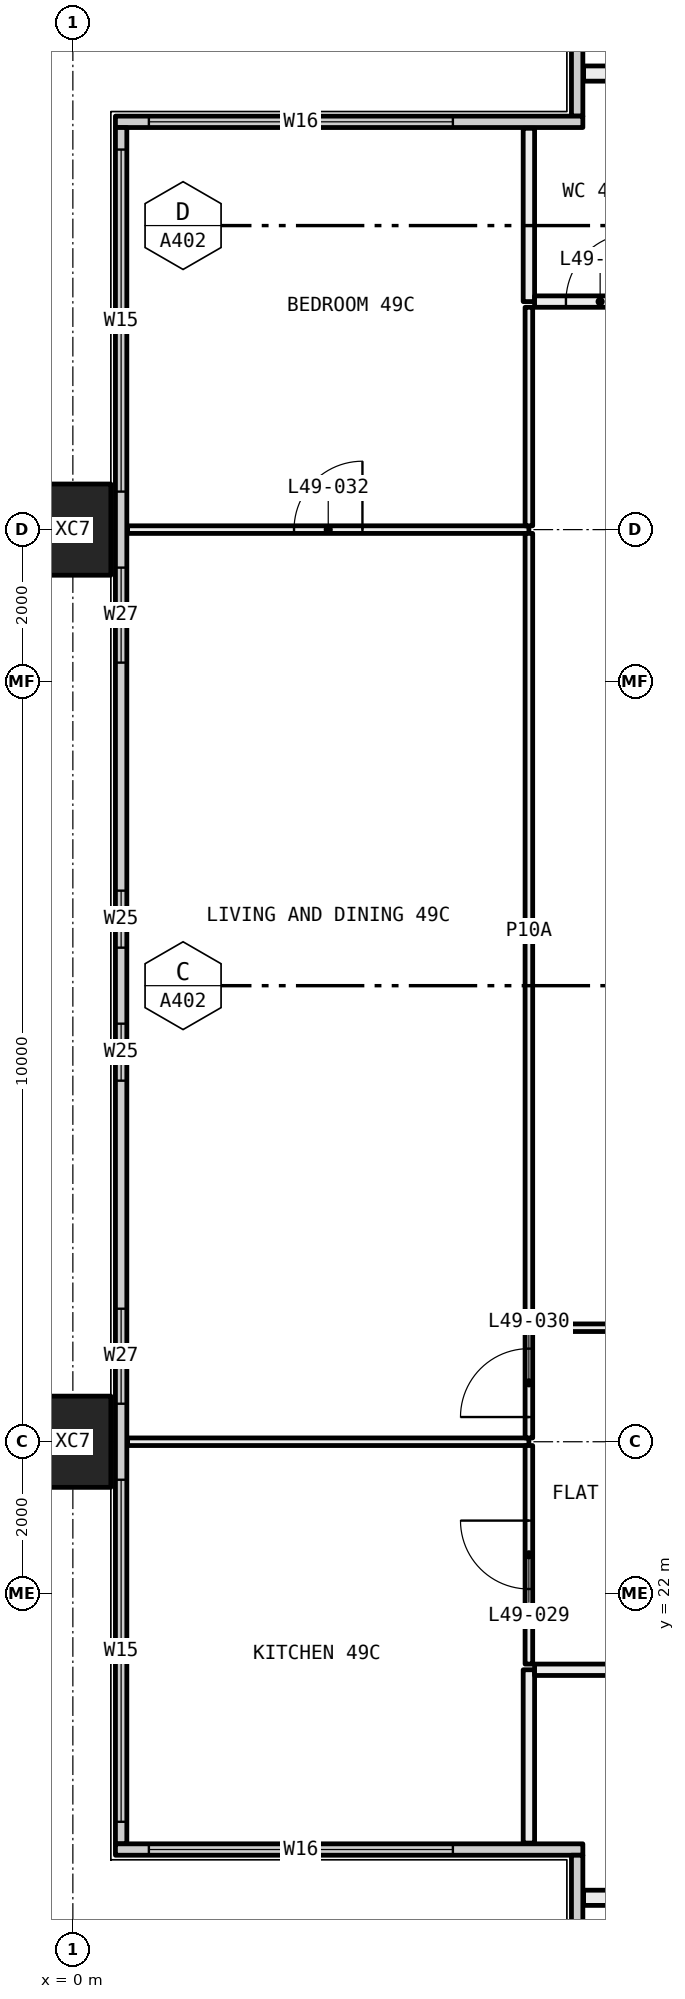
"""IFC4 building model, lengths in metres.
Left out: names, types, materials, properties, quantities, classifications, styles, units other than length and angle.
Written with IfcOpenShell. Run it as: python <this file> out.ifc"""

import sys

from ifc_helpers import new_model, si_unit, direction, frame, frame_2d, origin, origin_2d, place, context, subcontext, project, spatial, rectangle, hollow_rectangle, extrude, element, fill, save


model = new_model("IFC4")
c1 = context("Model", 3, precision=1e-05, world=origin(), true_north=direction((0.0, 1.0)))
c2 = subcontext(c1, "Body", "Model", "MODEL_VIEW")
j1 = project(units=[si_unit("LENGTHUNIT", "METRE"), si_unit("PLANEANGLEUNIT", "RADIAN")], contexts=[c1])
p1 = place(None, origin())
s1 = spatial("IfcSite", under=j1, at=p1, CompositionType="ELEMENT")
p2 = place(p1, origin())
s2 = spatial("IfcBuilding", under=s1, at=p2, CompositionType="ELEMENT")
p3 = place(p2, frame((0.0, 0.0, 185.85)))
s3 = spatial("IfcBuildingStorey", under=s2, at=p3, CompositionType="ELEMENT", Elevation=185.85)
for number, where, z_axis, x_axis in (
    (1, (0.0, 24.0, -0.4), (0.0, 0.0, 1.0), (0.0, 1.0, 0.0)),
    (2, (0.0, 36.0, -0.4), (0.0, 0.0, 1.0), (0.0, 1.0, 0.0)),
):
    element("IfcColumn", number, at=place(p3, frame(where, z_axis=z_axis, x_axis=x_axis)), inside=s3, PredefinedType="COLUMN", context=c2, shape_type="SweptSolid", body=[
        extrude(hollow_rectangle(XDim=1.2, YDim=1.0, WallThickness=0.045, at=origin_2d()), origin(), (0.0, 0.0, 1.0), 3.45),
    ])
p4 = place(p3, frame((6.635, 41.44, 0.0), z_axis=(0.0, 0.0, 1.0), x_axis=(0.0, 1.0, 0.0)))
e3 = element("IfcWall", 3, at=p4, inside=s3, PredefinedType="ELEMENTEDWALL", context=c2, shape_type="SweptSolid", body=[
    extrude(rectangle(XDim=5.85, YDim=0.15, at=frame_2d((2.925, 0.0))), origin(), (0.0, 0.0, 1.0), 3.05),
])
p5 = place(p4, frame((1.56, 0.0, 0.45)))
e4 = element("IfcOpeningElement", 4, at=p5, cuts=e3, PredefinedType="OPENING", context=c2, shape_type="SweptSolid", body=[
    extrude(rectangle(XDim=4.0, YDim=2.55, at=frame_2d((2.0, 1.275))), frame((0.0, 0.085, 0.0), z_axis=(0.0, -1.0, 0.0), x_axis=(1.0, 0.0, 0.0)), (0.0, 0.0, 1.0), 0.17),
])
p6 = place(p3, frame((0.56, 41.365, 0.0), z_axis=(0.0, 0.0, 1.0), x_axis=(1.0, 0.0, 0.0)))
e5 = element("IfcWall", 5, at=p6, inside=s3, PredefinedType="ELEMENTEDWALL", context=c2, shape_type="SweptSolid", body=[
    extrude(rectangle(XDim=6.15, YDim=0.15, at=frame_2d((3.075, 0.0))), origin(), (0.0, 0.0, 1.0), 3.05),
])
p7 = place(p6, frame((0.44, 0.0, 0.45)))
e6 = element("IfcOpeningElement", 6, at=p7, cuts=e5, PredefinedType="OPENING", context=c2, shape_type="SweptSolid", body=[
    extrude(rectangle(XDim=4.0, YDim=2.55, at=frame_2d((2.0, 1.275))), frame((0.0, 0.085, 0.0), z_axis=(0.0, -1.0, 0.0), x_axis=(1.0, 0.0, 0.0)), (0.0, 0.0, 1.0), 0.17),
])
p8 = place(p3, frame((0.635, 18.71, 0.0), z_axis=(0.0, 0.0, 1.0), x_axis=(0.0, 1.0, 0.0)))
e7 = element("IfcWall", 7, at=p8, inside=s3, PredefinedType="ELEMENTEDWALL", context=c2, shape_type="SweptSolid", body=[
    extrude(rectangle(XDim=22.58, YDim=0.15, at=frame_2d((11.29, 0.0))), origin(), (0.0, 0.0, 1.0), 3.05),
])
p9 = place(p8, frame((0.29, 0.0, 0.45)))
e8 = element("IfcOpeningElement", 8, at=p9, cuts=e7, PredefinedType="OPENING", context=c2, shape_type="SweptSolid", body=[
    extrude(rectangle(XDim=4.5, YDim=2.55, at=frame_2d((2.25, 1.275))), frame((0.0, 0.085, 0.0), z_axis=(0.0, -1.0, 0.0), x_axis=(1.0, 0.0, 0.0)), (0.0, 0.0, 1.0), 0.17),
])
p10 = place(p8, frame((5.79, 0.0, 0.45)))
e9 = element("IfcOpeningElement", 9, at=p10, cuts=e7, PredefinedType="OPENING", context=c2, shape_type="SweptSolid", body=[
    extrude(rectangle(XDim=1.25, YDim=2.55, at=frame_2d((0.625, 1.275))), frame((0.0, 0.085, 0.0), z_axis=(0.0, -1.0, 0.0), x_axis=(1.0, 0.0, 0.0)), (0.0, 0.0, 1.0), 0.17),
])
p11 = place(p8, frame((10.04, 0.0, 0.45)))
e10 = element("IfcOpeningElement", 10, at=p11, cuts=e7, PredefinedType="OPENING", context=c2, shape_type="SweptSolid", body=[
    extrude(rectangle(XDim=0.75, YDim=2.55, at=frame_2d((0.375, 1.275))), frame((0.0, 0.085, 0.0), z_axis=(0.0, -1.0, 0.0), x_axis=(1.0, 0.0, 0.0)), (0.0, 0.0, 1.0), 0.17),
])
p12 = place(p8, frame((11.79, 0.0, 0.45)))
e11 = element("IfcOpeningElement", 11, at=p12, cuts=e7, PredefinedType="OPENING", context=c2, shape_type="SweptSolid", body=[
    extrude(rectangle(XDim=0.75, YDim=2.55, at=frame_2d((0.375, 1.275))), frame((0.0, 0.085, 0.0), z_axis=(0.0, -1.0, 0.0), x_axis=(1.0, 0.0, 0.0)), (0.0, 0.0, 1.0), 0.17),
])
p13 = place(p8, frame((15.54, 0.0, 0.45)))
e12 = element("IfcOpeningElement", 12, at=p13, cuts=e7, PredefinedType="OPENING", context=c2, shape_type="SweptSolid", body=[
    extrude(rectangle(XDim=1.25, YDim=2.55, at=frame_2d((0.625, 1.275))), frame((0.0, 0.085, 0.0), z_axis=(0.0, -1.0, 0.0), x_axis=(1.0, 0.0, 0.0)), (0.0, 0.0, 1.0), 0.17),
])
p14 = place(p8, frame((17.79, 0.0, 0.45)))
e13 = element("IfcOpeningElement", 13, at=p14, cuts=e7, PredefinedType="OPENING", context=c2, shape_type="SweptSolid", body=[
    extrude(rectangle(XDim=4.5, YDim=2.55, at=frame_2d((2.25, 1.275))), frame((0.0, 0.085, 0.0), z_axis=(0.0, -1.0, 0.0), x_axis=(1.0, 0.0, 0.0)), (0.0, 0.0, 1.0), 0.17),
])
p15 = place(p3, frame((0.56, 18.635, 0.0), z_axis=(0.0, 0.0, 1.0), x_axis=(1.0, 0.0, 0.0)))
e14 = element("IfcWall", 14, at=p15, inside=s3, PredefinedType="ELEMENTEDWALL", context=c2, shape_type="SweptSolid", body=[
    extrude(rectangle(XDim=6.15, YDim=0.15, at=frame_2d((3.075, 0.0))), origin(), (0.0, 0.0, 1.0), 3.05),
])
p16 = place(p15, frame((0.44, 0.0, 0.45)))
e15 = element("IfcOpeningElement", 15, at=p16, cuts=e14, PredefinedType="OPENING", context=c2, shape_type="SweptSolid", body=[
    extrude(rectangle(XDim=4.0, YDim=2.55, at=frame_2d((2.0, 1.275))), frame((0.0, 0.085, 0.0), z_axis=(0.0, -1.0, 0.0), x_axis=(1.0, 0.0, 0.0)), (0.0, 0.0, 1.0), 0.17),
])
p17 = place(p3, frame((6.635, 12.71, 0.0), z_axis=(0.0, 0.0, 1.0), x_axis=(0.0, 1.0, 0.0)))
e16 = element("IfcWall", 16, at=p17, inside=s3, PredefinedType="ELEMENTEDWALL", context=c2, shape_type="SweptSolid", body=[
    extrude(rectangle(XDim=5.85, YDim=0.15, at=frame_2d((2.925, 0.0))), origin(), (0.0, 0.0, 1.0), 3.05),
])
p18 = place(p17, frame((0.29, 0.0, 0.45)))
e17 = element("IfcOpeningElement", 17, at=p18, cuts=e16, PredefinedType="OPENING", context=c2, shape_type="SweptSolid", body=[
    extrude(rectangle(XDim=4.0, YDim=2.55, at=frame_2d((2.0, 1.275))), frame((0.0, 0.085, 0.0), z_axis=(0.0, -1.0, 0.0), x_axis=(1.0, 0.0, 0.0)), (0.0, 0.0, 1.0), 0.17),
])
p19 = place(p3, frame((10.1, 18.0, 0.0), z_axis=(0.0, 0.0, 1.0), x_axis=(-1.0, 0.0, 0.0)))
e18 = element("IfcWall", 18, at=p19, inside=s3, PredefinedType="PARTITIONING", context=c2, shape_type="SweptSolid", body=[
    extrude(rectangle(XDim=3.38, YDim=0.2, at=frame_2d((1.69, 0.0))), origin(), (0.0, 0.0, 1.0), 3.05),
])
p20 = place(p3, frame((6.72, 42.0, 0.0), z_axis=(0.0, 0.0, 1.0), x_axis=(1.0, 0.0, 0.0)))
e19 = element("IfcWall", 19, at=p20, inside=s3, PredefinedType="PARTITIONING", context=c2, shape_type="SweptSolid", body=[
    extrude(rectangle(XDim=1.08, YDim=0.2, at=frame_2d((0.54, 0.0))), origin(), (0.0, 0.0, 1.0), 3.05),
])
p21 = place(p3, frame((6.0, 24.0, 0.0), z_axis=(0.0, 0.0, 1.0), x_axis=(-1.0, 0.0, 0.0)))
e20 = element("IfcWall", 20, at=p21, inside=s3, PredefinedType="PARTITIONING", context=c2, shape_type="SweptSolid", body=[
    extrude(rectangle(XDim=5.28, YDim=0.1, at=frame_2d((2.64, 0.0))), origin(), (0.0, 0.0, 1.0), 2.45),
])
p22 = place(p3, frame((6.0, 18.72, 0.0), z_axis=(0.0, 0.0, 1.0), x_axis=(0.0, 1.0, 0.0)))
e21 = element("IfcWall", 21, at=p22, inside=s3, PredefinedType="PARTITIONING", context=c2, shape_type="SweptSolid", body=[
    extrude(rectangle(XDim=2.28, YDim=0.15, at=frame_2d((1.14, 0.0))), origin(), (0.0, 0.0, 1.0), 3.05),
])
p23 = place(p3, frame((6.0, 21.075, 0.0), z_axis=(0.0, 0.0, 1.0), x_axis=(0.0, 1.0, 0.0)))
e22 = element("IfcWall", 22, at=p23, inside=s3, PredefinedType="PARTITIONING", context=c2, shape_type="SweptSolid", body=[
    extrude(rectangle(XDim=2.875, YDim=0.1, at=frame_2d((1.438, 0.0))), origin(), (0.0, 0.0, 1.0), 2.45),
])
p24 = place(p23, frame((0.988, 0.0, 0.0)))
e23 = element("IfcOpeningElement", 23, at=p24, cuts=e22, PredefinedType="OPENING", context=c2, shape_type="SweptSolid", body=[
    extrude(rectangle(XDim=0.9, YDim=2.1, at=frame_2d((0.45, 1.05))), frame((0.0, 0.06, 0.0), z_axis=(0.0, -1.0, 0.0), x_axis=(1.0, 0.0, 0.0)), (0.0, 0.0, 1.0), 0.12),
])
p25 = place(p3, frame((6.0, 36.0, 0.0), z_axis=(0.0, 0.0, 1.0), x_axis=(-1.0, 0.0, 0.0)))
e24 = element("IfcWall", 24, at=p25, inside=s3, PredefinedType="PARTITIONING", context=c2, shape_type="SweptSolid", body=[
    extrude(rectangle(XDim=5.28, YDim=0.1, at=frame_2d((2.64, 0.0))), origin(), (0.0, 0.0, 1.0), 2.45),
])
p26 = place(p25, frame((2.19, 0.0, 0.0)))
e25 = element("IfcOpeningElement", 25, at=p26, cuts=e24, PredefinedType="OPENING", context=c2, shape_type="SweptSolid", body=[
    extrude(rectangle(XDim=0.9, YDim=2.1, at=frame_2d((0.45, 1.05))), frame((0.0, 0.06, 0.0), z_axis=(0.0, -1.0, 0.0), x_axis=(1.0, 0.0, 0.0)), (0.0, 0.0, 1.0), 0.12),
])
p27 = place(p3, frame((6.0, 24.05, 0.0), z_axis=(0.0, 0.0, 1.0), x_axis=(0.0, 1.0, 0.0)))
e26 = element("IfcWall", 26, at=p27, inside=s3, PredefinedType="PARTITIONING", context=c2, shape_type="SweptSolid", body=[
    extrude(rectangle(XDim=1.45, YDim=0.1, at=frame_2d((0.725, 0.0))), origin(), (0.0, 0.0, 1.0), 2.45),
])
p28 = place(p27, frame((0.275, 0.0, 0.0)))
e27 = element("IfcOpeningElement", 27, at=p28, cuts=e26, PredefinedType="OPENING", context=c2, shape_type="SweptSolid", body=[
    extrude(rectangle(XDim=0.9, YDim=2.1, at=frame_2d((0.45, 1.05))), frame((0.0, 0.06, 0.0), z_axis=(0.0, -1.0, 0.0), x_axis=(1.0, 0.0, 0.0)), (0.0, 0.0, 1.0), 0.12),
])
p29 = place(p3, frame((6.0, 25.5, 0.0), z_axis=(0.0, 0.0, 1.0), x_axis=(0.0, 1.0, 0.0)))
e28 = element("IfcWall", 28, at=p29, inside=s3, PredefinedType="PARTITIONING", context=c2, shape_type="SweptSolid", body=[
    extrude(rectangle(XDim=10.45, YDim=0.1, at=frame_2d((5.225, 0.0))), origin(), (0.0, 0.0, 1.0), 2.45),
])
p30 = place(p3, frame((6.0, 36.05, 0.0), z_axis=(0.0, 0.0, 1.0), x_axis=(0.0, 1.0, 0.0)))
e29 = element("IfcWall", 29, at=p30, inside=s3, PredefinedType="PARTITIONING", context=c2, shape_type="SweptSolid", body=[
    extrude(rectangle(XDim=2.875, YDim=0.1, at=frame_2d((1.438, 0.0))), origin(), (0.0, 0.0, 1.0), 2.45),
])
p31 = place(p3, frame((6.0, 39.0, 0.0), z_axis=(0.0, 0.0, 1.0), x_axis=(0.0, 1.0, 0.0)))
e30 = element("IfcWall", 30, at=p31, inside=s3, PredefinedType="PARTITIONING", context=c2, shape_type="SweptSolid", body=[
    extrude(rectangle(XDim=2.28, YDim=0.15, at=frame_2d((1.14, 0.0))), origin(), (0.0, 0.0, 1.0), 3.05),
])
p32 = place(p3, frame((10.0, 21.0, 0.0), z_axis=(0.0, 0.0, 1.0), x_axis=(-1.0, 0.0, 0.0)))
e31 = element("IfcWall", 31, at=p32, inside=s3, PredefinedType="PARTITIONING", context=c2, shape_type="SweptSolid", body=[
    extrude(rectangle(XDim=3.925, YDim=0.15, at=frame_2d((1.962, 0.0))), origin(), (0.0, 0.0, 1.0), 3.05),
])
p33 = place(p32, frame((1.512, 0.0, 0.0)))
e32 = element("IfcOpeningElement", 32, at=p33, cuts=e31, PredefinedType="OPENING", context=c2, shape_type="SweptSolid", body=[
    extrude(rectangle(XDim=0.9, YDim=2.1, at=frame_2d((0.45, 1.05))), frame((0.0, 0.085, 0.0), z_axis=(0.0, -1.0, 0.0), x_axis=(1.0, 0.0, 0.0)), (0.0, 0.0, 1.0), 0.17),
])
p34 = place(p3, frame((10.0, 25.5, 0.0), z_axis=(0.0, 0.0, 1.0), x_axis=(-1.0, 0.0, 0.0)))
e33 = element("IfcWall", 33, at=p34, inside=s3, PredefinedType="PARTITIONING", context=c2, shape_type="SweptSolid", body=[
    extrude(rectangle(XDim=3.95, YDim=0.1, at=frame_2d((1.975, 0.0))), origin(), (0.0, 0.0, 1.0), 3.05),
])
p35 = place(p34, frame((1.525, 0.0, 0.0)))
e34 = element("IfcOpeningElement", 34, at=p35, cuts=e33, PredefinedType="OPENING", context=c2, shape_type="SweptSolid", body=[
    extrude(rectangle(XDim=0.9, YDim=2.1, at=frame_2d((0.45, 1.05))), frame((0.0, 0.06, 0.0), z_axis=(0.0, -1.0, 0.0), x_axis=(1.0, 0.0, 0.0)), (0.0, 0.0, 1.0), 0.12),
])
p36 = place(p3, frame((7.8, 39.0, 0.0), z_axis=(0.0, 0.0, 1.0), x_axis=(-1.0, 0.0, 0.0)))
e35 = element("IfcWall", 35, at=p36, inside=s3, PredefinedType="PARTITIONING", context=c2, shape_type="SweptSolid", body=[
    extrude(rectangle(XDim=1.725, YDim=0.15, at=frame_2d((0.863, 0.0))), origin(), (0.0, 0.0, 1.0), 3.05),
])
p37 = place(p36, frame((0.413, 0.0, 0.0)))
e36 = element("IfcOpeningElement", 36, at=p37, cuts=e35, PredefinedType="OPENING", context=c2, shape_type="SweptSolid", body=[
    extrude(rectangle(XDim=0.9, YDim=2.1, at=frame_2d((0.45, 1.05))), frame((0.0, 0.085, 0.0), z_axis=(0.0, -1.0, 0.0), x_axis=(1.0, 0.0, 0.0)), (0.0, 0.0, 1.0), 0.17),
])
p38 = place(p7, origin())
e37 = element("IfcWindow", 37, at=p38, inside=s3, PartitioningType="SINGLE_PANEL", PredefinedType="WINDOW", context=c2, shape_type="SweptSolid", body=[
    extrude(rectangle(XDim=4.0, YDim=2.55, at=frame_2d((2.0, 1.275))), frame((0.0, 0.03, 0.0), z_axis=(0.0, -1.0, 0.0), x_axis=(1.0, 0.0, 0.0)), (0.0, 0.0, 1.0), 0.06),
])
fill(e6, e37)
p39 = place(p9, origin())
e38 = element("IfcWindow", 38, at=p39, inside=s3, PartitioningType="SINGLE_PANEL", PredefinedType="WINDOW", context=c2, shape_type="SweptSolid", body=[
    extrude(rectangle(XDim=4.5, YDim=2.55, at=frame_2d((2.25, 1.275))), frame((0.0, 0.03, 0.0), z_axis=(0.0, -1.0, 0.0), x_axis=(1.0, 0.0, 0.0)), (0.0, 0.0, 1.0), 0.06),
])
fill(e8, e38)
p40 = place(p10, origin())
e39 = element("IfcWindow", 39, at=p40, inside=s3, PartitioningType="SINGLE_PANEL", PredefinedType="WINDOW", context=c2, shape_type="SweptSolid", body=[
    extrude(rectangle(XDim=1.25, YDim=2.55, at=frame_2d((0.625, 1.275))), frame((0.0, 0.03, 0.0), z_axis=(0.0, -1.0, 0.0), x_axis=(1.0, 0.0, 0.0)), (0.0, 0.0, 1.0), 0.06),
])
fill(e9, e39)
p41 = place(p11, origin())
e40 = element("IfcWindow", 40, at=p41, inside=s3, PartitioningType="SINGLE_PANEL", PredefinedType="WINDOW", context=c2, shape_type="SweptSolid", body=[
    extrude(rectangle(XDim=0.75, YDim=2.55, at=frame_2d((0.375, 1.275))), frame((0.0, 0.03, 0.0), z_axis=(0.0, -1.0, 0.0), x_axis=(1.0, 0.0, 0.0)), (0.0, 0.0, 1.0), 0.06),
])
fill(e10, e40)
p42 = place(p12, origin())
e41 = element("IfcWindow", 41, at=p42, inside=s3, PartitioningType="SINGLE_PANEL", PredefinedType="WINDOW", context=c2, shape_type="SweptSolid", body=[
    extrude(rectangle(XDim=0.75, YDim=2.55, at=frame_2d((0.375, 1.275))), frame((0.0, 0.03, 0.0), z_axis=(0.0, -1.0, 0.0), x_axis=(1.0, 0.0, 0.0)), (0.0, 0.0, 1.0), 0.06),
])
fill(e11, e41)
p43 = place(p13, origin())
e42 = element("IfcWindow", 42, at=p43, inside=s3, PartitioningType="SINGLE_PANEL", PredefinedType="WINDOW", context=c2, shape_type="SweptSolid", body=[
    extrude(rectangle(XDim=1.25, YDim=2.55, at=frame_2d((0.625, 1.275))), frame((0.0, 0.03, 0.0), z_axis=(0.0, -1.0, 0.0), x_axis=(1.0, 0.0, 0.0)), (0.0, 0.0, 1.0), 0.06),
])
fill(e12, e42)
p44 = place(p14, origin())
e43 = element("IfcWindow", 43, at=p44, inside=s3, PartitioningType="SINGLE_PANEL", PredefinedType="WINDOW", context=c2, shape_type="SweptSolid", body=[
    extrude(rectangle(XDim=4.5, YDim=2.55, at=frame_2d((2.25, 1.275))), frame((0.0, 0.03, 0.0), z_axis=(0.0, -1.0, 0.0), x_axis=(1.0, 0.0, 0.0)), (0.0, 0.0, 1.0), 0.06),
])
fill(e13, e43)
p45 = place(p16, origin())
e44 = element("IfcWindow", 44, at=p45, inside=s3, PartitioningType="SINGLE_PANEL", PredefinedType="WINDOW", context=c2, shape_type="SweptSolid", body=[
    extrude(rectangle(XDim=4.0, YDim=2.55, at=frame_2d((2.0, 1.275))), frame((0.0, 0.03, 0.0), z_axis=(0.0, -1.0, 0.0), x_axis=(1.0, 0.0, 0.0)), (0.0, 0.0, 1.0), 0.06),
])
fill(e15, e44)
p46 = place(p24, origin())
e45 = element("IfcDoor", 45, at=p46, inside=s3, OperationType="SINGLE_SWING_LEFT", PredefinedType="DOOR", context=c2, shape_type="SweptSolid", body=[
    extrude(rectangle(XDim=0.9, YDim=2.1, at=frame_2d((0.45, 1.05))), frame((0.0, 0.025, 0.0), z_axis=(0.0, -1.0, 0.0), x_axis=(1.0, 0.0, 0.0)), (0.0, 0.0, 1.0), 0.05),
])
fill(e23, e45)
p47 = place(p28, origin())
e46 = element("IfcDoor", 46, at=p47, inside=s3, OperationType="SINGLE_SWING_RIGHT", PredefinedType="DOOR", context=c2, shape_type="SweptSolid", body=[
    extrude(rectangle(XDim=0.9, YDim=2.1, at=frame_2d((0.45, 1.05))), frame((0.0, 0.025, 0.0), z_axis=(0.0, -1.0, 0.0), x_axis=(1.0, 0.0, 0.0)), (0.0, 0.0, 1.0), 0.05),
])
fill(e27, e46)
p48 = place(p26, frame((0.9, 0.0, 0.0), x_axis=(-1.0, 0.0, 0.0)))
e47 = element("IfcDoor", 47, at=p48, inside=s3, OperationType="SINGLE_SWING_LEFT", PredefinedType="DOOR", context=c2, shape_type="SweptSolid", body=[
    extrude(rectangle(XDim=0.9, YDim=2.1, at=frame_2d((0.45, 1.05))), frame((0.0, 0.025, 0.0), z_axis=(0.0, -1.0, 0.0), x_axis=(1.0, 0.0, 0.0)), (0.0, 0.0, 1.0), 0.05),
])
fill(e25, e47)
p49 = place(p37, frame((0.9, 0.0, 0.0), x_axis=(-1.0, 0.0, 0.0)))
e48 = element("IfcDoor", 48, at=p49, inside=s3, OperationType="SINGLE_SWING_LEFT", PredefinedType="DOOR", context=c2, shape_type="SweptSolid", body=[
    extrude(rectangle(XDim=0.9, YDim=2.1, at=frame_2d((0.45, 1.05))), frame((0.0, 0.025, 0.0), z_axis=(0.0, -1.0, 0.0), x_axis=(1.0, 0.0, 0.0)), (0.0, 0.0, 1.0), 0.05),
])
fill(e36, e48)
save(model, sys.argv[1])
